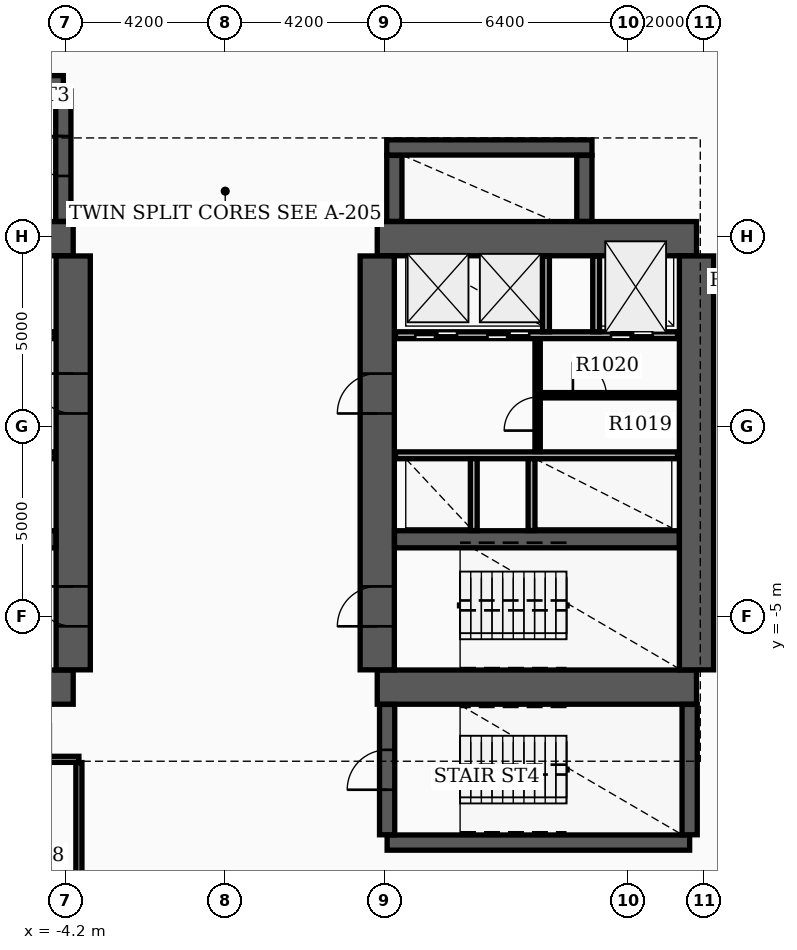
"""IFC4 building model, lengths in metres.
Left out: names, types, materials, properties, quantities, classifications, styles, units other than length and angle.
Written with IfcOpenShell. Run it as: python <this file> out.ifc"""

import sys

from ifc_helpers import new_model, si_unit, direction, frame, frame_2d, origin, place, context, subcontext, project, spatial, rectangle, extrude, element, fill, save


model = new_model("IFC4")
c1 = context("Model", 3, precision=1e-05, world=origin(), true_north=direction((0.0, 1.0)))
c2 = subcontext(c1, "Body", "Model", "MODEL_VIEW")
j1 = project(units=[si_unit("LENGTHUNIT", "METRE"), si_unit("PLANEANGLEUNIT", "RADIAN")], contexts=[c1])
p1 = place(None, origin())
s1 = spatial("IfcSite", under=j1, at=p1, CompositionType="ELEMENT")
p2 = place(p1, origin())
s2 = spatial("IfcBuilding", under=s1, at=p2, CompositionType="ELEMENT")
p3 = place(p2, frame((0.0, 0.0, 67.8)))
s3 = spatial("IfcBuildingStorey", under=s2, at=p3, CompositionType="ELEMENT", Elevation=67.8)
for number, where, z_axis, x_axis in (
    (1, (-12.4, -6.85, 0.0), (0.0, 0.0, 1.0), (1.0, 0.0, 0.0)),
    (2, (-12.4, 4.95, 0.0), (0.0, 0.0, 1.0), (1.0, 0.0, 0.0)),
):
    element("IfcWall", number, at=place(p3, frame(where, z_axis=z_axis, x_axis=x_axis)), inside=s3, PredefinedType="SHEAR", context=c2, shape_type="SweptSolid", body=[
        extrude(rectangle(XDim=8.4, YDim=0.9, at=frame_2d((4.2, 0.0))), origin(), (0.0, 0.0, 1.0), 3.7),
    ])
p4 = place(p3, frame((-4.0, -6.395, 0.0), z_axis=(0.0, 0.0, 1.0), x_axis=(0.0, 1.0, 0.0)))
e3 = element("IfcWall", 3, at=p4, inside=s3, PredefinedType="SHEAR", context=c2, shape_type="SweptSolid", body=[
    extrude(rectangle(XDim=10.89, YDim=0.9, at=frame_2d((5.445, 0.0))), origin(), (0.0, 0.0, 1.0), 3.7),
])
p5 = place(p4, frame((1.145, 0.0, 0.0)))
e4 = element("IfcOpeningElement", 4, at=p5, cuts=e3, PredefinedType="OPENING", context=c2, shape_type="SweptSolid", body=[
    extrude(rectangle(XDim=1.05, YDim=2.15, at=frame_2d((0.525, 1.075))), frame((0.0, 0.46, 0.0), z_axis=(0.0, -1.0, 0.0), x_axis=(1.0, 0.0, 0.0)), (0.0, 0.0, 1.0), 0.92),
])
p6 = place(p4, frame((6.745, 0.0, 0.0)))
e5 = element("IfcOpeningElement", 5, at=p6, cuts=e3, PredefinedType="OPENING", context=c2, shape_type="SweptSolid", body=[
    extrude(rectangle(XDim=1.05, YDim=2.15, at=frame_2d((0.525, 1.075))), frame((0.0, 0.46, 0.0), z_axis=(0.0, -1.0, 0.0), x_axis=(1.0, 0.0, 0.0)), (0.0, 0.0, 1.0), 0.92),
])
p7 = place(p3, frame((-11.945, -2.96, 0.0), z_axis=(0.0, 0.0, 1.0), x_axis=(1.0, 0.0, 0.0)))
e6 = element("IfcWall", 6, at=p7, inside=s3, PredefinedType="SHEAR", context=c2, shape_type="SweptSolid", body=[
    extrude(rectangle(XDim=7.49, YDim=0.45, at=frame_2d((3.745, 0.0))), origin(), (0.0, 0.0, 1.0), 3.7),
])
for number, where, z_axis, x_axis in (
    (7, (4.0, -6.85, 0.0), (0.0, 0.0, 1.0), (1.0, 0.0, 0.0)),
    (8, (4.0, 4.95, 0.0), (0.0, 0.0, 1.0), (1.0, 0.0, 0.0)),
):
    element("IfcWall", number, at=place(p3, frame(where, z_axis=z_axis, x_axis=x_axis)), inside=s3, PredefinedType="SHEAR", context=c2, shape_type="SweptSolid", body=[
        extrude(rectangle(XDim=8.4, YDim=0.9, at=frame_2d((4.2, 0.0))), origin(), (0.0, 0.0, 1.0), 3.7),
    ])
p8 = place(p3, frame((4.0, -6.395, 0.0), z_axis=(0.0, 0.0, 1.0), x_axis=(0.0, 1.0, 0.0)))
e9 = element("IfcWall", 9, at=p8, inside=s3, PredefinedType="SHEAR", context=c2, shape_type="SweptSolid", body=[
    extrude(rectangle(XDim=10.89, YDim=0.9, at=frame_2d((5.445, 0.0))), origin(), (0.0, 0.0, 1.0), 3.7),
])
p9 = place(p8, frame((1.145, 0.0, 0.0)))
e10 = element("IfcOpeningElement", 10, at=p9, cuts=e9, PredefinedType="OPENING", context=c2, shape_type="SweptSolid", body=[
    extrude(rectangle(XDim=1.05, YDim=2.15, at=frame_2d((0.525, 1.075))), frame((0.0, 0.46, 0.0), z_axis=(0.0, -1.0, 0.0), x_axis=(1.0, 0.0, 0.0)), (0.0, 0.0, 1.0), 0.92),
])
p10 = place(p8, frame((6.745, 0.0, 0.0)))
e11 = element("IfcOpeningElement", 11, at=p10, cuts=e9, PredefinedType="OPENING", context=c2, shape_type="SweptSolid", body=[
    extrude(rectangle(XDim=1.05, YDim=2.15, at=frame_2d((0.525, 1.075))), frame((0.0, 0.46, 0.0), z_axis=(0.0, -1.0, 0.0), x_axis=(1.0, 0.0, 0.0)), (0.0, 0.0, 1.0), 0.92),
])
p11 = place(p3, frame((12.4, -6.395, 0.0), z_axis=(0.0, 0.0, 1.0), x_axis=(0.0, 1.0, 0.0)))
e12 = element("IfcWall", 12, at=p11, inside=s3, PredefinedType="SHEAR", context=c2, shape_type="SweptSolid", body=[
    extrude(rectangle(XDim=10.89, YDim=0.9, at=frame_2d((5.445, 0.0))), origin(), (0.0, 0.0, 1.0), 3.7),
])
p12 = place(p3, frame((4.455, -2.96, 0.0), z_axis=(0.0, 0.0, 1.0), x_axis=(1.0, 0.0, 0.0)))
e13 = element("IfcWall", 13, at=p12, inside=s3, PredefinedType="SHEAR", context=c2, shape_type="SweptSolid", body=[
    extrude(rectangle(XDim=7.49, YDim=0.45, at=frame_2d((3.745, 0.0))), origin(), (0.0, 0.0, 1.0), 3.7),
])
p13 = place(p3, frame((-12.22, 9.04, 0.0), z_axis=(0.0, 0.0, 1.0), x_axis=(1.0, 0.0, 0.0)))
e14 = element("IfcWall", 14, at=p13, inside=s3, PredefinedType="SHEAR", context=c2, shape_type="SweptSolid", body=[
    extrude(rectangle(XDim=7.96, YDim=0.4, at=frame_2d((3.98, 0.0))), origin(), (0.0, 0.0, 1.0), 3.7),
])
p14 = place(p3, frame((-4.26, 5.405, 0.0), z_axis=(0.0, 0.0, 1.0), x_axis=(0.0, 1.0, 0.0)))
e15 = element("IfcWall", 15, at=p14, inside=s3, PredefinedType="SHEAR", context=c2, shape_type="SweptSolid", body=[
    extrude(rectangle(XDim=3.43, YDim=0.4, at=frame_2d((1.715, 0.0))), origin(), (0.0, 0.0, 1.0), 3.7),
])
p15 = place(p14, frame((1.195, 0.0, 0.0)))
e16 = element("IfcOpeningElement", 16, at=p15, cuts=e15, PredefinedType="OPENING", context=c2, shape_type="SweptSolid", body=[
    extrude(rectangle(XDim=1.05, YDim=2.15, at=frame_2d((0.525, 1.075))), frame((0.0, 0.21, 0.0), z_axis=(0.0, -1.0, 0.0), x_axis=(1.0, 0.0, 0.0)), (0.0, 0.0, 1.0), 0.42),
])
p16 = place(p3, frame((4.26, -10.94, 0.0), z_axis=(0.0, 0.0, 1.0), x_axis=(1.0, 0.0, 0.0)))
e17 = element("IfcWall", 17, at=p16, inside=s3, PredefinedType="SHEAR", context=c2, shape_type="SweptSolid", body=[
    extrude(rectangle(XDim=7.96, YDim=0.4, at=frame_2d((3.98, 0.0))), origin(), (0.0, 0.0, 1.0), 3.7),
])
p17 = place(p3, frame((4.26, -10.735, 0.0), z_axis=(0.0, 0.0, 1.0), x_axis=(0.0, 1.0, 0.0)))
e18 = element("IfcWall", 18, at=p17, inside=s3, PredefinedType="SHEAR", context=c2, shape_type="SweptSolid", body=[
    extrude(rectangle(XDim=3.43, YDim=0.4, at=frame_2d((1.715, 0.0))), origin(), (0.0, 0.0, 1.0), 3.7),
])
p18 = place(p17, frame((1.185, 0.0, 0.0)))
e19 = element("IfcOpeningElement", 19, at=p18, cuts=e18, PredefinedType="OPENING", context=c2, shape_type="SweptSolid", body=[
    extrude(rectangle(XDim=1.05, YDim=2.15, at=frame_2d((0.525, 1.075))), frame((0.0, 0.21, 0.0), z_axis=(0.0, -1.0, 0.0), x_axis=(1.0, 0.0, 0.0)), (0.0, 0.0, 1.0), 0.42),
])
p19 = place(p3, frame((12.22, -10.735, 0.0), z_axis=(0.0, 0.0, 1.0), x_axis=(0.0, 1.0, 0.0)))
e20 = element("IfcWall", 20, at=p19, inside=s3, PredefinedType="SHEAR", context=c2, shape_type="SweptSolid", body=[
    extrude(rectangle(XDim=3.43, YDim=0.4, at=frame_2d((1.715, 0.0))), origin(), (0.0, 0.0, 1.0), 3.7),
])
p20 = place(p3, frame((4.45, 5.405, 0.0), z_axis=(0.0, 0.0, 1.0), x_axis=(0.0, 1.0, 0.0)))
e21 = element("IfcWall", 21, at=p20, inside=s3, PredefinedType="SHEAR", context=c2, shape_type="SweptSolid", body=[
    extrude(rectangle(XDim=1.735, YDim=0.4, at=frame_2d((0.867, 0.0))), origin(), (0.0, 0.0, 1.0), 3.7),
])
p21 = place(p3, frame((4.25, 7.35, 0.0), z_axis=(0.0, 0.0, 1.0), x_axis=(1.0, 0.0, 0.0)))
e22 = element("IfcWall", 22, at=p21, inside=s3, PredefinedType="SHEAR", context=c2, shape_type="SweptSolid", body=[
    extrude(rectangle(XDim=5.4, YDim=0.4, at=frame_2d((2.7, 0.0))), origin(), (0.0, 0.0, 1.0), 3.7),
])
p22 = place(p3, frame((9.45, 5.405, 0.0), z_axis=(0.0, 0.0, 1.0), x_axis=(0.0, 1.0, 0.0)))
e23 = element("IfcWall", 23, at=p22, inside=s3, PredefinedType="SHEAR", context=c2, shape_type="SweptSolid", body=[
    extrude(rectangle(XDim=1.735, YDim=0.4, at=frame_2d((0.867, 0.0))), origin(), (0.0, 0.0, 1.0), 3.7),
])
p23 = place(p3, frame((-11.9, 2.41, 0.0), z_axis=(0.0, 0.0, 1.0), x_axis=(1.0, 0.0, 0.0)))
e24 = element("IfcWall", 24, at=p23, inside=s3, PredefinedType="SOLIDWALL", context=c2, shape_type="SweptSolid", body=[
    extrude(rectangle(XDim=7.42, YDim=0.18, at=frame_2d((3.71, 0.0))), origin(), (0.0, 0.0, 1.0), 2.9),
])
p24 = place(p23, frame((0.55, 0.0, 0.0)))
e25 = element("IfcOpeningElement", 25, at=p24, cuts=e24, PredefinedType="OPENING", context=c2, shape_type="SweptSolid", body=[
    extrude(rectangle(XDim=1.1, YDim=2.15, at=frame_2d((0.55, 1.075))), frame((0.0, 0.1, 0.0), z_axis=(0.0, -1.0, 0.0), x_axis=(1.0, 0.0, 0.0)), (0.0, 0.0, 1.0), 0.2),
])
p25 = place(p23, frame((3.85, 0.0, 0.0)))
e26 = element("IfcOpeningElement", 26, at=p25, cuts=e24, PredefinedType="OPENING", context=c2, shape_type="SweptSolid", body=[
    extrude(rectangle(XDim=1.1, YDim=2.15, at=frame_2d((0.55, 1.075))), frame((0.0, 0.1, 0.0), z_axis=(0.0, -1.0, 0.0), x_axis=(1.0, 0.0, 0.0)), (0.0, 0.0, 1.0), 0.2),
])
p26 = place(p23, frame((5.75, 0.0, 0.0)))
e27 = element("IfcOpeningElement", 27, at=p26, cuts=e24, PredefinedType="OPENING", context=c2, shape_type="SweptSolid", body=[
    extrude(rectangle(XDim=1.1, YDim=2.15, at=frame_2d((0.55, 1.075))), frame((0.0, 0.1, 0.0), z_axis=(0.0, -1.0, 0.0), x_axis=(1.0, 0.0, 0.0)), (0.0, 0.0, 1.0), 0.2),
])
p27 = place(p3, frame((4.48, 2.41, 0.0), z_axis=(0.0, 0.0, 1.0), x_axis=(1.0, 0.0, 0.0)))
e28 = element("IfcWall", 28, at=p27, inside=s3, PredefinedType="SOLIDWALL", context=c2, shape_type="SweptSolid", body=[
    extrude(rectangle(XDim=7.42, YDim=0.18, at=frame_2d((3.71, 0.0))), origin(), (0.0, 0.0, 1.0), 2.9),
])
p28 = place(p27, frame((5.67, 0.0, 0.0)))
e29 = element("IfcOpeningElement", 29, at=p28, cuts=e28, PredefinedType="OPENING", context=c2, shape_type="SweptSolid", body=[
    extrude(rectangle(XDim=1.1, YDim=2.15, at=frame_2d((0.55, 1.075))), frame((0.0, 0.1, 0.0), z_axis=(0.0, -1.0, 0.0), x_axis=(1.0, 0.0, 0.0)), (0.0, 0.0, 1.0), 0.2),
])
p29 = place(p27, frame((0.52, 0.0, 0.0)))
e30 = element("IfcOpeningElement", 30, at=p29, cuts=e28, PredefinedType="OPENING", context=c2, shape_type="SweptSolid", body=[
    extrude(rectangle(XDim=1.1, YDim=2.15, at=frame_2d((0.55, 1.075))), frame((0.0, 0.1, 0.0), z_axis=(0.0, -1.0, 0.0), x_axis=(1.0, 0.0, 0.0)), (0.0, 0.0, 1.0), 0.2),
])
p30 = place(p27, frame((2.42, 0.0, 0.0)))
e31 = element("IfcOpeningElement", 31, at=p30, cuts=e28, PredefinedType="OPENING", context=c2, shape_type="SweptSolid", body=[
    extrude(rectangle(XDim=1.1, YDim=2.15, at=frame_2d((0.55, 1.075))), frame((0.0, 0.1, 0.0), z_axis=(0.0, -1.0, 0.0), x_axis=(1.0, 0.0, 0.0)), (0.0, 0.0, 1.0), 0.2),
])
for number, where, z_axis, x_axis in (
    (32, (-11.9, -0.75, 0.0), (0.0, 0.0, 1.0), (1.0, 0.0, 0.0)),
    (33, (4.48, -0.75, 0.0), (0.0, 0.0, 1.0), (1.0, 0.0, 0.0)),
):
    element("IfcWall", number, at=place(p3, frame(where, z_axis=z_axis, x_axis=x_axis)), inside=s3, PredefinedType="SOLIDWALL", context=c2, shape_type="SweptSolid", body=[
        extrude(rectangle(XDim=7.42, YDim=0.18, at=frame_2d((3.71, 0.0))), origin(), (0.0, 0.0, 1.0), 2.9),
    ])
for number, where, z_axis, x_axis in (
    (34, (8.44, 2.5, 0.0), (0.0, 0.0, 1.0), (0.0, 1.0, 0.0)),
    (35, (9.76, 2.5, 0.0), (0.0, 0.0, 1.0), (0.0, 1.0, 0.0)),
):
    element("IfcWall", number, at=place(p3, frame(where, z_axis=z_axis, x_axis=x_axis)), inside=s3, PredefinedType="SOLIDWALL", context=c2, shape_type="SweptSolid", body=[
        extrude(rectangle(XDim=1.99, YDim=0.18, at=frame_2d((0.995, 0.0))), origin(), (0.0, 0.0, 1.0), 2.9),
    ])
for number, where, z_axis, x_axis in (
    (36, (6.54, -2.73, 0.0), (0.0, 0.0, 1.0), (0.0, 1.0, 0.0)),
    (37, (8.06, -2.73, 0.0), (0.0, 0.0, 1.0), (0.0, 1.0, 0.0)),
):
    element("IfcWall", number, at=place(p3, frame(where, z_axis=z_axis, x_axis=x_axis)), inside=s3, PredefinedType="SOLIDWALL", context=c2, shape_type="SweptSolid", body=[
        extrude(rectangle(XDim=1.89, YDim=0.18, at=frame_2d((0.945, 0.0))), origin(), (0.0, 0.0, 1.0), 2.9),
    ])
p31 = place(p3, frame((8.22, -0.65, 0.0), z_axis=(0.0, 0.0, 1.0), x_axis=(0.0, 1.0, 0.0)))
e38 = element("IfcWall", 38, at=p31, inside=s3, PredefinedType="SOLIDWALL", context=c2, shape_type="SweptSolid", body=[
    extrude(rectangle(XDim=2.96, YDim=0.14, at=frame_2d((1.48, 0.0))), origin(), (0.0, 0.0, 1.0), 2.9),
])
p32 = place(p31, frame((0.55, 0.0, 0.0)))
e39 = element("IfcOpeningElement", 39, at=p32, cuts=e38, PredefinedType="OPENING", context=c2, shape_type="SweptSolid", body=[
    extrude(rectangle(XDim=0.88, YDim=2.1, at=frame_2d((0.44, 1.05))), frame((0.0, 0.08, 0.0), z_axis=(0.0, -1.0, 0.0), x_axis=(1.0, 0.0, 0.0)), (0.0, 0.0, 1.0), 0.16),
])
p33 = place(p3, frame((8.298, 0.83, 0.0), z_axis=(0.0, 0.0, 1.0), x_axis=(1.0, 0.0, 0.0)))
e40 = element("IfcWall", 40, at=p33, inside=s3, PredefinedType="PARTITIONING", context=c2, shape_type="SweptSolid", body=[
    extrude(rectangle(XDim=3.552, YDim=0.14, at=frame_2d((1.776, 0.0))), origin(), (0.0, 0.0, 1.0), 2.9),
])
p34 = place(p33, frame((0.85, 0.0, 0.0)))
e41 = element("IfcOpeningElement", 41, at=p34, cuts=e40, PredefinedType="OPENING", context=c2, shape_type="SweptSolid", body=[
    extrude(rectangle(XDim=0.88, YDim=2.1, at=frame_2d((0.44, 1.05))), frame((0.0, 0.08, 0.0), z_axis=(0.0, -1.0, 0.0), x_axis=(1.0, 0.0, 0.0)), (0.0, 0.0, 1.0), 0.16),
])
p35 = place(p3, frame((-6.29, -8.75, 0.0), z_axis=(0.0, 0.0, 1.0), x_axis=(1.0, 0.0, 0.0)))
e42 = element("IfcWall", 42, at=p35, inside=s3, PredefinedType="PARTITIONING", context=c2, shape_type="SweptSolid", body=[
    extrude(rectangle(XDim=2.44, YDim=0.16, at=frame_2d((1.22, 0.0))), origin(), (0.0, 0.0, 1.0), 2.9),
])
p36 = place(p35, frame((0.74, 0.0, 0.0)))
e43 = element("IfcOpeningElement", 43, at=p36, cuts=e42, PredefinedType="OPENING", context=c2, shape_type="SweptSolid", body=[
    extrude(rectangle(XDim=0.96, YDim=2.15, at=frame_2d((0.48, 1.075))), frame((0.0, 0.09, 0.0), z_axis=(0.0, -1.0, 0.0), x_axis=(1.0, 0.0, 0.0)), (0.0, 0.0, 1.0), 0.18),
])
p37 = place(p3, frame((-3.85, -13.065, 0.0), z_axis=(0.0, 0.0, 1.0), x_axis=(0.0, 1.0, 0.0)))
e44 = element("IfcWall", 44, at=p37, inside=s3, PredefinedType="PARTITIONING", context=c2, shape_type="SweptSolid", body=[
    extrude(rectangle(XDim=4.23, YDim=0.16, at=frame_2d((2.115, 0.0))), origin(), (0.0, 0.0, 1.0), 2.9),
])
p38 = place(p5, origin())
e45 = element("IfcDoor", 45, at=p38, inside=s3, OperationType="SINGLE_SWING_RIGHT", PredefinedType="DOOR", context=c2, shape_type="SweptSolid", body=[
    extrude(rectangle(XDim=1.05, YDim=2.15, at=frame_2d((0.525, 1.075))), frame((0.0, 0.025, 0.0), z_axis=(0.0, -1.0, 0.0), x_axis=(1.0, 0.0, 0.0)), (0.0, 0.0, 1.0), 0.05),
])
fill(e4, e45)
p39 = place(p9, origin())
e46 = element("IfcDoor", 46, at=p39, inside=s3, OperationType="SINGLE_SWING_LEFT", PredefinedType="DOOR", context=c2, shape_type="SweptSolid", body=[
    extrude(rectangle(XDim=1.05, YDim=2.15, at=frame_2d((0.525, 1.075))), frame((0.0, 0.025, 0.0), z_axis=(0.0, -1.0, 0.0), x_axis=(1.0, 0.0, 0.0)), (0.0, 0.0, 1.0), 0.05),
])
fill(e10, e46)
p40 = place(p6, origin())
e47 = element("IfcDoor", 47, at=p40, inside=s3, OperationType="SINGLE_SWING_RIGHT", PredefinedType="DOOR", context=c2, shape_type="SweptSolid", body=[
    extrude(rectangle(XDim=1.05, YDim=2.15, at=frame_2d((0.525, 1.075))), frame((0.0, 0.025, 0.0), z_axis=(0.0, -1.0, 0.0), x_axis=(1.0, 0.0, 0.0)), (0.0, 0.0, 1.0), 0.05),
])
fill(e5, e47)
p41 = place(p10, origin())
e48 = element("IfcDoor", 48, at=p41, inside=s3, OperationType="SINGLE_SWING_LEFT", PredefinedType="DOOR", context=c2, shape_type="SweptSolid", body=[
    extrude(rectangle(XDim=1.05, YDim=2.15, at=frame_2d((0.525, 1.075))), frame((0.0, 0.025, 0.0), z_axis=(0.0, -1.0, 0.0), x_axis=(1.0, 0.0, 0.0)), (0.0, 0.0, 1.0), 0.05),
])
fill(e11, e48)
p42 = place(p15, origin())
e49 = element("IfcDoor", 49, at=p42, inside=s3, OperationType="SINGLE_SWING_RIGHT", PredefinedType="DOOR", context=c2, shape_type="SweptSolid", body=[
    extrude(rectangle(XDim=1.05, YDim=2.15, at=frame_2d((0.525, 1.075))), frame((0.0, 0.025, 0.0), z_axis=(0.0, -1.0, 0.0), x_axis=(1.0, 0.0, 0.0)), (0.0, 0.0, 1.0), 0.05),
])
fill(e16, e49)
p43 = place(p18, origin())
e50 = element("IfcDoor", 50, at=p43, inside=s3, OperationType="SINGLE_SWING_LEFT", PredefinedType="DOOR", context=c2, shape_type="SweptSolid", body=[
    extrude(rectangle(XDim=1.05, YDim=2.15, at=frame_2d((0.525, 1.075))), frame((0.0, 0.025, 0.0), z_axis=(0.0, -1.0, 0.0), x_axis=(1.0, 0.0, 0.0)), (0.0, 0.0, 1.0), 0.05),
])
fill(e19, e50)
p44 = place(p28, origin())
e51 = element("IfcDoor", 51, at=p44, inside=s3, OperationType="DOUBLE_DOOR_SLIDING", PredefinedType="DOOR", context=c2, shape_type="SweptSolid", body=[
    extrude(rectangle(XDim=1.1, YDim=2.15, at=frame_2d((0.55, 1.075))), frame((0.0, 0.025, 0.0), z_axis=(0.0, -1.0, 0.0), x_axis=(1.0, 0.0, 0.0)), (0.0, 0.0, 1.0), 0.05),
])
fill(e29, e51)
p45 = place(p29, origin())
e52 = element("IfcDoor", 52, at=p45, inside=s3, OperationType="DOUBLE_DOOR_SLIDING", PredefinedType="DOOR", context=c2, shape_type="SweptSolid", body=[
    extrude(rectangle(XDim=1.1, YDim=2.15, at=frame_2d((0.55, 1.075))), frame((0.0, 0.025, 0.0), z_axis=(0.0, -1.0, 0.0), x_axis=(1.0, 0.0, 0.0)), (0.0, 0.0, 1.0), 0.05),
])
fill(e30, e52)
p46 = place(p30, origin())
e53 = element("IfcDoor", 53, at=p46, inside=s3, OperationType="DOUBLE_DOOR_SLIDING", PredefinedType="DOOR", context=c2, shape_type="SweptSolid", body=[
    extrude(rectangle(XDim=1.1, YDim=2.15, at=frame_2d((0.55, 1.075))), frame((0.0, 0.025, 0.0), z_axis=(0.0, -1.0, 0.0), x_axis=(1.0, 0.0, 0.0)), (0.0, 0.0, 1.0), 0.05),
])
fill(e31, e53)
p47 = place(p32, origin())
e54 = element("IfcDoor", 54, at=p47, inside=s3, OperationType="SINGLE_SWING_LEFT", PredefinedType="DOOR", context=c2, shape_type="SweptSolid", body=[
    extrude(rectangle(XDim=0.88, YDim=2.1, at=frame_2d((0.44, 1.05))), frame((0.0, 0.025, 0.0), z_axis=(0.0, -1.0, 0.0), x_axis=(1.0, 0.0, 0.0)), (0.0, 0.0, 1.0), 0.05),
])
fill(e39, e54)
p48 = place(p34, origin())
e55 = element("IfcDoor", 55, at=p48, inside=s3, OperationType="SINGLE_SWING_LEFT", PredefinedType="DOOR", context=c2, shape_type="SweptSolid", body=[
    extrude(rectangle(XDim=0.88, YDim=2.1, at=frame_2d((0.44, 1.05))), frame((0.0, 0.025, 0.0), z_axis=(0.0, -1.0, 0.0), x_axis=(1.0, 0.0, 0.0)), (0.0, 0.0, 1.0), 0.05),
])
fill(e41, e55)
save(model, sys.argv[1])
